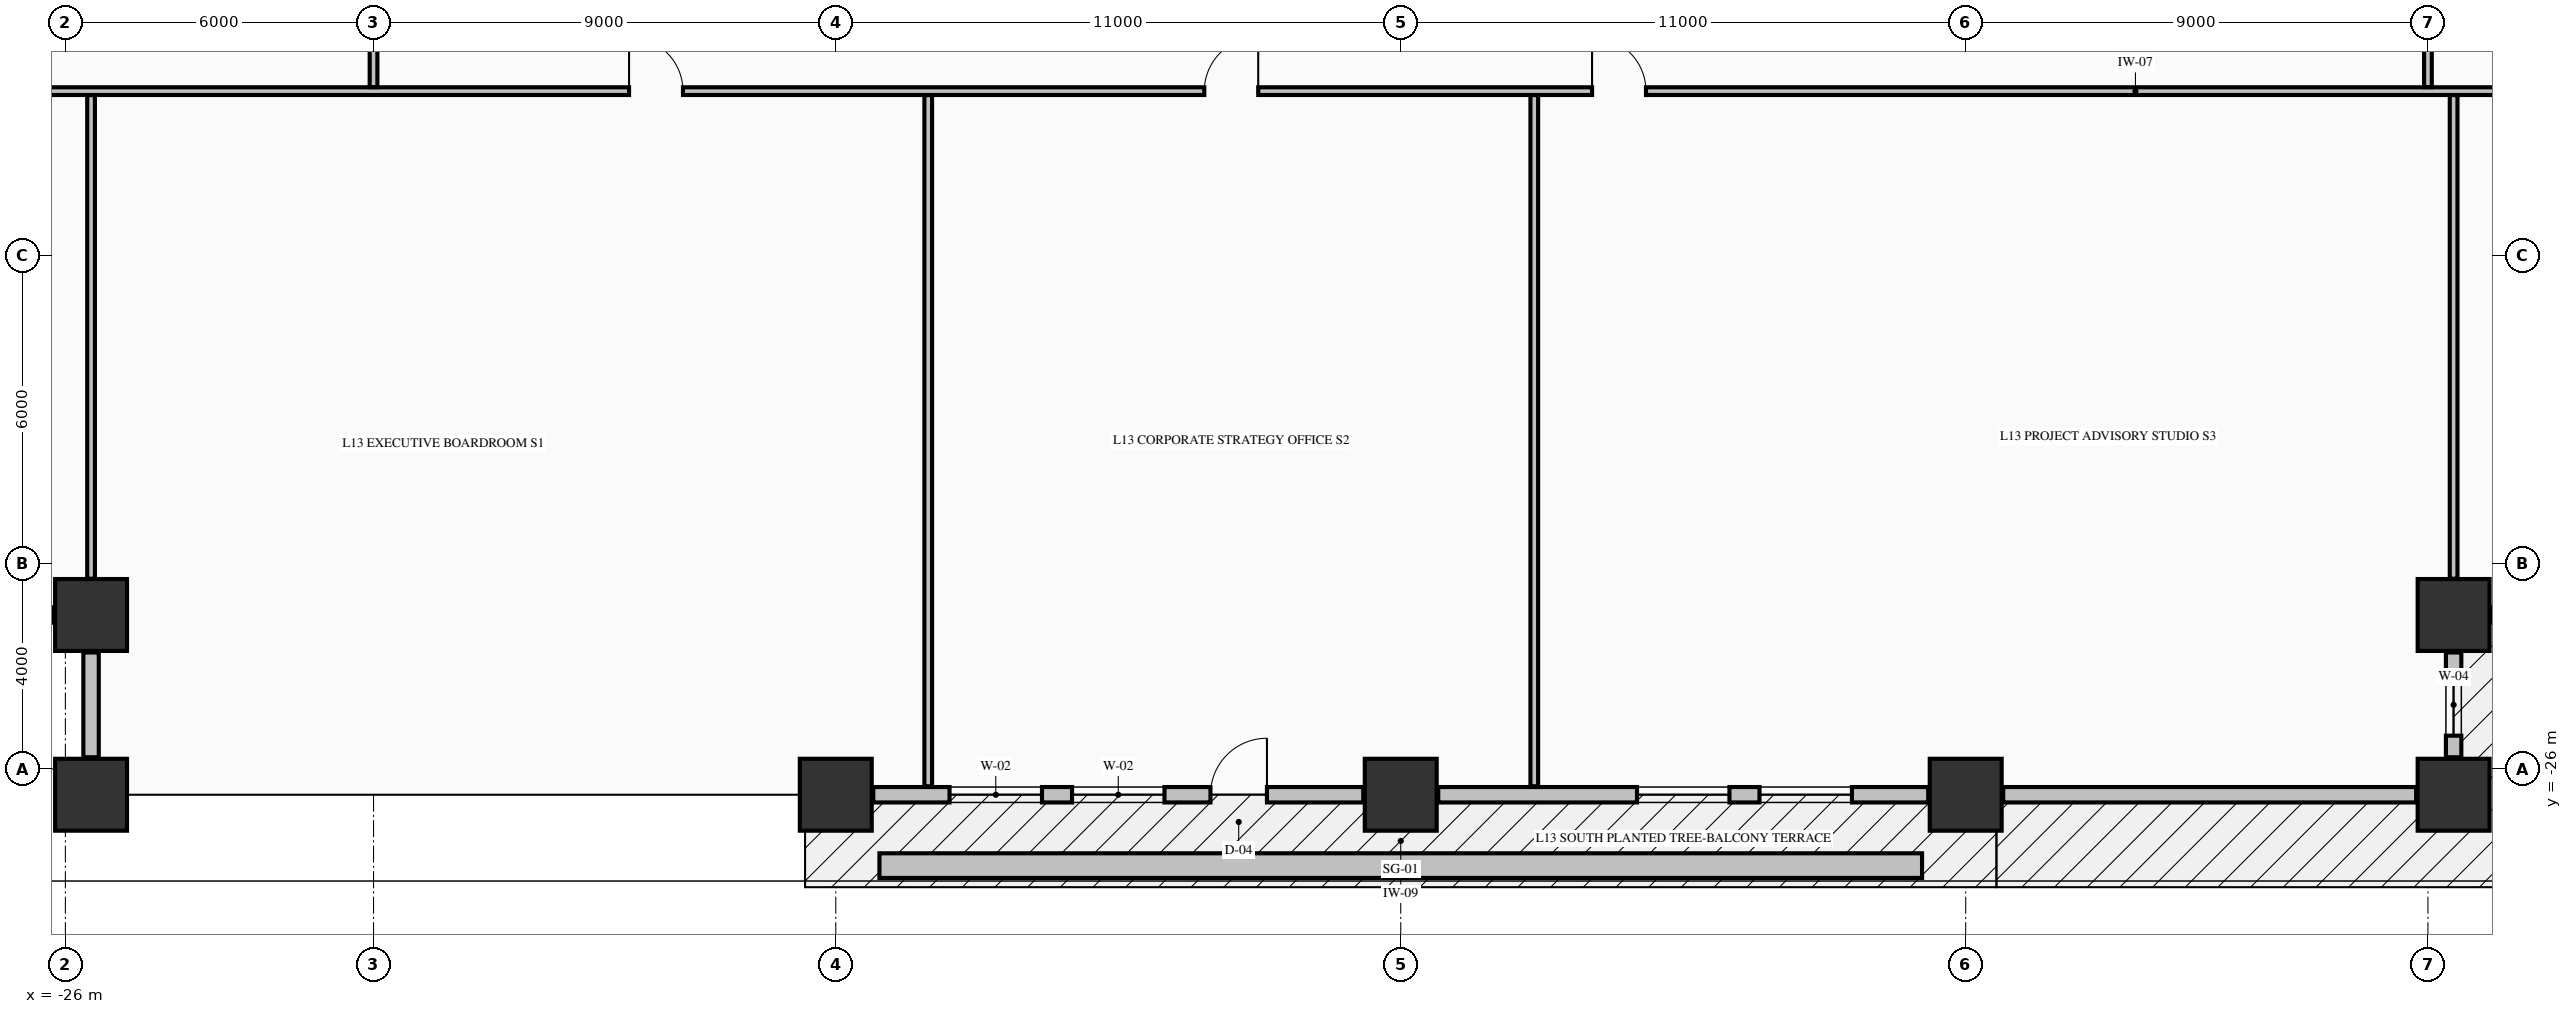
"""IFC4 building model, lengths in metres.
Left out: names, types, materials, properties, quantities, classifications, styles, units other than length and angle.
Written with IfcOpenShell. Run it as: python <this file> out.ifc"""

import sys

from ifc_helpers import new_model, si_unit, direction, frame, frame_2d, origin, origin_2d, place, context, subcontext, project, spatial, rectangle, extrude, element, fill, save


model = new_model("IFC4")
c1 = context("Model", 3, precision=1e-05, world=origin(), true_north=direction((0.0, 1.0)))
c2 = subcontext(c1, "Body", "Model", "MODEL_VIEW")
j1 = project(units=[si_unit("LENGTHUNIT", "METRE"), si_unit("PLANEANGLEUNIT", "RADIAN")], contexts=[c1])
p1 = place(None, origin())
s1 = spatial("IfcSite", under=j1, at=p1, CompositionType="ELEMENT")
p2 = place(p1, origin())
s2 = spatial("IfcBuilding", under=s1, at=p2, CompositionType="ELEMENT")
p3 = place(p2, frame((0.0, 0.0, 57.19)))
s3 = spatial("IfcBuildingStorey", under=s2, at=p3, CompositionType="ELEMENT", Elevation=57.19)
for number, where, z_axis, x_axis in (
    (1, (-25.5, -26.5, -0.425), (0.0, 0.0, 1.0), (1.0, 0.0, 0.0)),
    (2, (-11.0, -26.5, -0.425), (0.0, 0.0, 1.0), (1.0, 0.0, 0.0)),
    (3, (0.0, -26.5, -0.425), (0.0, 0.0, 1.0), (1.0, 0.0, 0.0)),
    (4, (11.0, -26.5, -0.425), (0.0, 0.0, 1.0), (1.0, 0.0, 0.0)),
    (5, (20.5, -26.5, -0.425), (0.0, 0.0, 1.0), (1.0, 0.0, 0.0)),
    (6, (-25.5, -23.0, -0.425), (0.0, 0.0, 1.0), (1.0, 0.0, 0.0)),
    (7, (20.5, -23.0, -0.425), (0.0, 0.0, 1.0), (1.0, 0.0, 0.0)),
):
    element("IfcColumn", number, at=place(p3, frame(where, z_axis=z_axis, x_axis=x_axis)), inside=s3, PredefinedType="COLUMN", context=c2, shape_type="SweptSolid", body=[
        extrude(rectangle(XDim=1.4, YDim=1.4, at=origin_2d()), origin(), (0.0, 0.0, 1.0), 3.695),
    ])
p4 = place(p3, frame((20.5, -25.77, 0.0), z_axis=(0.0, 0.0, 1.0), x_axis=(0.0, 1.0, 0.0)))
e8 = element("IfcWall", 8, at=p4, inside=s3, PredefinedType="STANDARD", context=c2, shape_type="SweptSolid", body=[
    extrude(rectangle(XDim=2.04, YDim=0.3, at=frame_2d((1.02, 0.0))), origin(), (0.0, 0.0, 1.0), 2.662),
])
p5 = place(p4, frame((0.42, 0.0, 0.82)))
e9 = element("IfcOpeningElement", 9, at=p5, cuts=e8, PredefinedType="OPENING", context=c2, shape_type="SweptSolid", body=[
    extrude(rectangle(XDim=1.2, YDim=1.65, at=frame_2d((0.6, 0.825))), frame((0.0, 0.16, 0.0), z_axis=(0.0, -1.0, 0.0), x_axis=(1.0, 0.0, 0.0)), (0.0, 0.0, 1.0), 0.32),
])
p6 = place(p3, frame((21.23, -23.0, 0.0), z_axis=(0.0, 0.0, 1.0), x_axis=(1.0, 0.0, 0.0)))
e10 = element("IfcWall", 10, at=p6, inside=s3, PredefinedType="STANDARD", context=c2, shape_type="SweptSolid", body=[
    extrude(rectangle(XDim=2.04, YDim=0.3, at=frame_2d((1.02, 0.0))), origin(), (0.0, 0.0, 1.0), 2.662),
])
p7 = place(p6, frame((0.42, 0.0, 0.82)))
e11 = element("IfcOpeningElement", 11, at=p7, cuts=e10, PredefinedType="OPENING", context=c2, shape_type="SweptSolid", body=[
    extrude(rectangle(XDim=1.2, YDim=1.65, at=frame_2d((0.6, 0.825))), frame((0.0, 0.16, 0.0), z_axis=(0.0, -1.0, 0.0), x_axis=(1.0, 0.0, 0.0)), (0.0, 0.0, 1.0), 0.32),
])
for number, where, z_axis, x_axis in (
    (12, (-28.27, -23.0, 0.0), (0.0, 0.0, 1.0), (1.0, 0.0, 0.0)),
    (13, (-25.5, -23.73, 0.0), (0.0, 0.0, 1.0), (0.0, -1.0, 0.0)),
):
    element("IfcWall", number, at=place(p3, frame(where, z_axis=z_axis, x_axis=x_axis)), inside=s3, PredefinedType="STANDARD", context=c2, shape_type="SweptSolid", body=[
        extrude(rectangle(XDim=2.04, YDim=0.3, at=frame_2d((1.02, 0.0))), origin(), (0.0, 0.0, 1.0), 1.462),
    ])
p8 = place(p3, frame((-10.27, -26.5, 0.0), z_axis=(0.0, 0.0, 1.0), x_axis=(1.0, 0.0, 0.0)))
e14 = element("IfcWall", 14, at=p8, inside=s3, PredefinedType="STANDARD", context=c2, shape_type="SweptSolid", body=[
    extrude(rectangle(XDim=9.54, YDim=0.3, at=frame_2d((4.77, 0.0))), origin(), (0.0, 0.0, 1.0), 2.662),
])
p9 = place(p8, frame((6.565, 0.0, 0.0)))
e15 = element("IfcOpeningElement", 15, at=p9, cuts=e14, PredefinedType="OPENING", context=c2, shape_type="SweptSolid", body=[
    extrude(rectangle(XDim=1.1, YDim=2.15, at=frame_2d((0.55, 1.075))), frame((0.0, 0.16, 0.0), z_axis=(0.0, -1.0, 0.0), x_axis=(1.0, 0.0, 0.0)), (0.0, 0.0, 1.0), 0.32),
])
p10 = place(p8, frame((1.485, 0.0, 0.78)))
e16 = element("IfcOpeningElement", 16, at=p10, cuts=e14, PredefinedType="OPENING", context=c2, shape_type="SweptSolid", body=[
    extrude(rectangle(XDim=1.8, YDim=1.72, at=frame_2d((0.9, 0.86))), frame((0.0, 0.16, 0.0), z_axis=(0.0, -1.0, 0.0), x_axis=(1.0, 0.0, 0.0)), (0.0, 0.0, 1.0), 0.32),
])
p11 = place(p8, frame((3.87, 0.0, 0.78)))
e17 = element("IfcOpeningElement", 17, at=p11, cuts=e14, PredefinedType="OPENING", context=c2, shape_type="SweptSolid", body=[
    extrude(rectangle(XDim=1.8, YDim=1.72, at=frame_2d((0.9, 0.86))), frame((0.0, 0.16, 0.0), z_axis=(0.0, -1.0, 0.0), x_axis=(1.0, 0.0, 0.0)), (0.0, 0.0, 1.0), 0.32),
])
p12 = place(p3, frame((0.73, -26.5, 0.0), z_axis=(0.0, 0.0, 1.0), x_axis=(1.0, 0.0, 0.0)))
e18 = element("IfcWall", 18, at=p12, inside=s3, PredefinedType="STANDARD", context=c2, shape_type="SweptSolid", body=[
    extrude(rectangle(XDim=9.54, YDim=0.3, at=frame_2d((4.77, 0.0))), origin(), (0.0, 0.0, 1.0), 2.662),
])
p13 = place(p12, frame((3.87, 0.0, 0.78)))
e19 = element("IfcOpeningElement", 19, at=p13, cuts=e18, PredefinedType="OPENING", context=c2, shape_type="SweptSolid", body=[
    extrude(rectangle(XDim=1.8, YDim=1.72, at=frame_2d((0.9, 0.86))), frame((0.0, 0.16, 0.0), z_axis=(0.0, -1.0, 0.0), x_axis=(1.0, 0.0, 0.0)), (0.0, 0.0, 1.0), 0.32),
])
p14 = place(p12, frame((6.255, 0.0, 0.78)))
e20 = element("IfcOpeningElement", 20, at=p14, cuts=e18, PredefinedType="OPENING", context=c2, shape_type="SweptSolid", body=[
    extrude(rectangle(XDim=1.8, YDim=1.72, at=frame_2d((0.9, 0.86))), frame((0.0, 0.16, 0.0), z_axis=(0.0, -1.0, 0.0), x_axis=(1.0, 0.0, 0.0)), (0.0, 0.0, 1.0), 0.32),
])
p15 = place(p3, frame((11.73, -26.5, 0.0), z_axis=(0.0, 0.0, 1.0), x_axis=(1.0, 0.0, 0.0)))
e21 = element("IfcWall", 21, at=p15, inside=s3, PredefinedType="STANDARD", context=c2, shape_type="SweptSolid", body=[
    extrude(rectangle(XDim=8.04, YDim=0.3, at=frame_2d((4.02, 0.0))), origin(), (0.0, 0.0, 1.0), 2.662),
])
p16 = place(p3, frame((-28.835, -12.8, 0.0), z_axis=(0.0, 0.0, 1.0), x_axis=(1.0, 0.0, 0.0)))
e22 = element("IfcWall", 22, at=p16, inside=s3, PredefinedType="PARTITIONING", context=c2, shape_type="SweptSolid", body=[
    extrude(rectangle(XDim=52.67, YDim=0.15, at=frame_2d((26.335, 0.0))), origin(), (0.0, 0.0, 1.0), 3.27),
])
p17 = place(p16, frame((13.81, 0.0, 0.0)))
e23 = element("IfcOpeningElement", 23, at=p17, cuts=e22, PredefinedType="OPENING", context=c2, shape_type="SweptSolid", body=[
    extrude(rectangle(XDim=1.05, YDim=2.15, at=frame_2d((0.525, 1.075))), frame((0.0, 0.085, 0.0), z_axis=(0.0, -1.0, 0.0), x_axis=(1.0, 0.0, 0.0)), (0.0, 0.0, 1.0), 0.17),
])
p18 = place(p16, frame((25.01, 0.0, 0.0)))
e24 = element("IfcOpeningElement", 24, at=p18, cuts=e22, PredefinedType="OPENING", context=c2, shape_type="SweptSolid", body=[
    extrude(rectangle(XDim=1.05, YDim=2.15, at=frame_2d((0.525, 1.075))), frame((0.0, 0.085, 0.0), z_axis=(0.0, -1.0, 0.0), x_axis=(1.0, 0.0, 0.0)), (0.0, 0.0, 1.0), 0.17),
])
p19 = place(p16, frame((32.56, 0.0, 0.0)))
e25 = element("IfcOpeningElement", 25, at=p19, cuts=e22, PredefinedType="OPENING", context=c2, shape_type="SweptSolid", body=[
    extrude(rectangle(XDim=1.05, YDim=2.15, at=frame_2d((0.525, 1.075))), frame((0.0, 0.085, 0.0), z_axis=(0.0, -1.0, 0.0), x_axis=(1.0, 0.0, 0.0)), (0.0, 0.0, 1.0), 0.17),
])
p20 = place(p3, frame((-25.5, -22.294, 0.0), z_axis=(0.0, 0.0, 1.0), x_axis=(0.0, 1.0, 0.0)))
e26 = element("IfcWall", 26, at=p20, inside=s3, PredefinedType="PARTITIONING", context=c2, shape_type="SweptSolid", body=[
    extrude(rectangle(XDim=9.416, YDim=0.15, at=frame_2d((4.708, 0.0))), origin(), (0.0, 0.0, 1.0), 3.27),
])
p21 = place(p3, frame((-20.0, -12.722, 0.0), z_axis=(0.0, 0.0, 1.0), x_axis=(0.0, 1.0, 0.0)))
e27 = element("IfcWall", 27, at=p21, inside=s3, PredefinedType="PARTITIONING", context=c2, shape_type="SweptSolid", body=[
    extrude(rectangle(XDim=2.166, YDim=0.15, at=frame_2d((1.083, 0.0))), origin(), (0.0, 0.0, 1.0), 2.61),
])
p22 = place(p21, frame((0.867, 0.0, 0.0)))
e28 = element("IfcOpeningElement", 28, at=p22, cuts=e27, PredefinedType="OPENING", context=c2, shape_type="SweptSolid", body=[
    extrude(rectangle(XDim=0.95, YDim=2.15, at=frame_2d((0.475, 1.075))), frame((0.0, 0.085, 0.0), z_axis=(0.0, -1.0, 0.0), x_axis=(1.0, 0.0, 0.0)), (0.0, 0.0, 1.0), 0.17),
])
for number, where, z_axis, x_axis in (
    (29, (-9.2, -26.335, 0.0), (0.0, 0.0, 1.0), (0.0, 1.0, 0.0)),
    (30, (2.6, -26.335, 0.0), (0.0, 0.0, 1.0), (0.0, 1.0, 0.0)),
):
    element("IfcWall", number, at=place(p3, frame(where, z_axis=z_axis, x_axis=x_axis)), inside=s3, PredefinedType="PARTITIONING", context=c2, shape_type="SweptSolid", body=[
        extrude(rectangle(XDim=13.457, YDim=0.15, at=frame_2d((6.729, 0.0))), origin(), (0.0, 0.0, 1.0), 3.27),
    ])
p23 = place(p3, frame((20.0, -12.722, 0.0), z_axis=(0.0, 0.0, 1.0), x_axis=(0.0, 1.0, 0.0)))
e31 = element("IfcWall", 31, at=p23, inside=s3, PredefinedType="PARTITIONING", context=c2, shape_type="SweptSolid", body=[
    extrude(rectangle(XDim=2.166, YDim=0.15, at=frame_2d((1.083, 0.0))), origin(), (0.0, 0.0, 1.0), 3.27),
])
p24 = place(p23, frame((0.867, 0.0, 0.0)))
e32 = element("IfcOpeningElement", 32, at=p24, cuts=e31, PredefinedType="OPENING", context=c2, shape_type="SweptSolid", body=[
    extrude(rectangle(XDim=0.95, YDim=2.15, at=frame_2d((0.475, 1.075))), frame((0.0, 0.085, 0.0), z_axis=(0.0, -1.0, 0.0), x_axis=(1.0, 0.0, 0.0)), (0.0, 0.0, 1.0), 0.17),
])
p25 = place(p3, frame((20.5, -22.294, 0.0), z_axis=(0.0, 0.0, 1.0), x_axis=(0.0, 1.0, 0.0)))
e33 = element("IfcWall", 33, at=p25, inside=s3, PredefinedType="PARTITIONING", context=c2, shape_type="SweptSolid", body=[
    extrude(rectangle(XDim=9.416, YDim=0.15, at=frame_2d((4.708, 0.0))), origin(), (0.0, 0.0, 1.0), 3.27),
])
p26 = place(p3, frame((-10.15, -27.88, -0.04), z_axis=(0.0, 0.0, 1.0), x_axis=(1.0, 0.0, 0.0)))
e34 = element("IfcWall", 34, at=p26, inside=s3, PredefinedType="PARAPET", context=c2, shape_type="SweptSolid", body=[
    extrude(rectangle(XDim=20.3, YDim=0.48, at=frame_2d((10.15, 0.0))), origin(), (0.0, 0.0, 1.0), 0.52),
])
p27 = place(p5, origin())
e35 = element("IfcWindow", 35, at=p27, inside=s3, PartitioningType="SINGLE_PANEL", PredefinedType="WINDOW", context=c2, shape_type="SweptSolid", body=[
    extrude(rectangle(XDim=1.2, YDim=1.65, at=frame_2d((0.6, 0.825))), frame((0.0, 0.03, 0.0), z_axis=(0.0, -1.0, 0.0), x_axis=(1.0, 0.0, 0.0)), (0.0, 0.0, 1.0), 0.06),
])
fill(e9, e35)
p28 = place(p9, origin())
e36 = element("IfcDoor", 36, at=p28, inside=s3, OperationType="SINGLE_SWING_RIGHT", PredefinedType="DOOR", context=c2, shape_type="SweptSolid", body=[
    extrude(rectangle(XDim=1.1, YDim=2.15, at=frame_2d((0.55, 1.075))), frame((0.0, 0.025, 0.0), z_axis=(0.0, -1.0, 0.0), x_axis=(1.0, 0.0, 0.0)), (0.0, 0.0, 1.0), 0.05),
])
fill(e15, e36)
p29 = place(p10, origin())
e37 = element("IfcWindow", 37, at=p29, inside=s3, PartitioningType="SINGLE_PANEL", PredefinedType="WINDOW", context=c2, shape_type="SweptSolid", body=[
    extrude(rectangle(XDim=1.8, YDim=1.72, at=frame_2d((0.9, 0.86))), frame((0.0, 0.03, 0.0), z_axis=(0.0, -1.0, 0.0), x_axis=(1.0, 0.0, 0.0)), (0.0, 0.0, 1.0), 0.06),
])
fill(e16, e37)
p30 = place(p11, origin())
e38 = element("IfcWindow", 38, at=p30, inside=s3, PartitioningType="SINGLE_PANEL", PredefinedType="WINDOW", context=c2, shape_type="SweptSolid", body=[
    extrude(rectangle(XDim=1.8, YDim=1.72, at=frame_2d((0.9, 0.86))), frame((0.0, 0.03, 0.0), z_axis=(0.0, -1.0, 0.0), x_axis=(1.0, 0.0, 0.0)), (0.0, 0.0, 1.0), 0.06),
])
fill(e17, e38)
p31 = place(p13, origin())
e39 = element("IfcWindow", 39, at=p31, inside=s3, PartitioningType="SINGLE_PANEL", PredefinedType="WINDOW", context=c2, shape_type="SweptSolid", body=[
    extrude(rectangle(XDim=1.8, YDim=1.72, at=frame_2d((0.9, 0.86))), frame((0.0, 0.03, 0.0), z_axis=(0.0, -1.0, 0.0), x_axis=(1.0, 0.0, 0.0)), (0.0, 0.0, 1.0), 0.06),
])
fill(e19, e39)
p32 = place(p14, origin())
e40 = element("IfcWindow", 40, at=p32, inside=s3, PartitioningType="SINGLE_PANEL", PredefinedType="WINDOW", context=c2, shape_type="SweptSolid", body=[
    extrude(rectangle(XDim=1.8, YDim=1.72, at=frame_2d((0.9, 0.86))), frame((0.0, 0.03, 0.0), z_axis=(0.0, -1.0, 0.0), x_axis=(1.0, 0.0, 0.0)), (0.0, 0.0, 1.0), 0.06),
])
fill(e20, e40)
p33 = place(p17, origin())
e41 = element("IfcDoor", 41, at=p33, inside=s3, OperationType="SINGLE_SWING_LEFT", PredefinedType="DOOR", context=c2, shape_type="SweptSolid", body=[
    extrude(rectangle(XDim=1.05, YDim=2.15, at=frame_2d((0.525, 1.075))), frame((0.0, 0.025, 0.0), z_axis=(0.0, -1.0, 0.0), x_axis=(1.0, 0.0, 0.0)), (0.0, 0.0, 1.0), 0.05),
])
fill(e23, e41)
p34 = place(p18, origin())
e42 = element("IfcDoor", 42, at=p34, inside=s3, OperationType="SINGLE_SWING_RIGHT", PredefinedType="DOOR", context=c2, shape_type="SweptSolid", body=[
    extrude(rectangle(XDim=1.05, YDim=2.15, at=frame_2d((0.525, 1.075))), frame((0.0, 0.025, 0.0), z_axis=(0.0, -1.0, 0.0), x_axis=(1.0, 0.0, 0.0)), (0.0, 0.0, 1.0), 0.05),
])
fill(e24, e42)
p35 = place(p19, origin())
e43 = element("IfcDoor", 43, at=p35, inside=s3, OperationType="SINGLE_SWING_LEFT", PredefinedType="DOOR", context=c2, shape_type="SweptSolid", body=[
    extrude(rectangle(XDim=1.05, YDim=2.15, at=frame_2d((0.525, 1.075))), frame((0.0, 0.025, 0.0), z_axis=(0.0, -1.0, 0.0), x_axis=(1.0, 0.0, 0.0)), (0.0, 0.0, 1.0), 0.05),
])
fill(e25, e43)
save(model, sys.argv[1])
